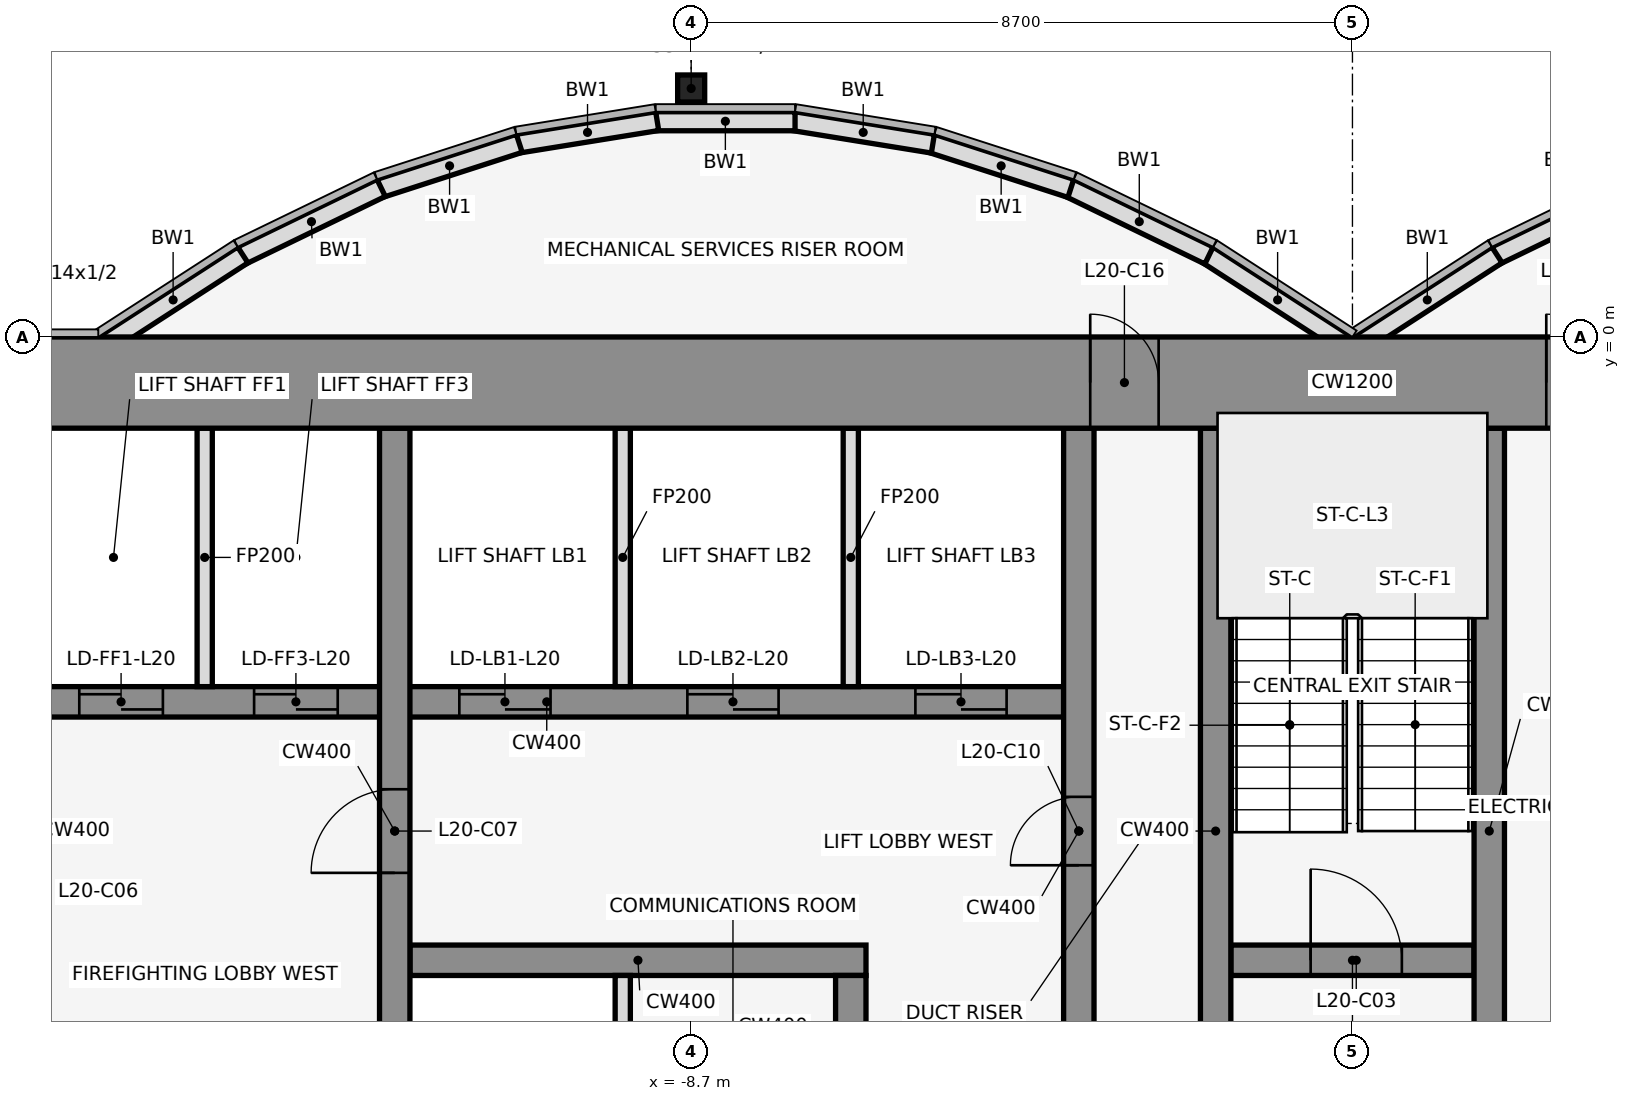
"""IFC4 building model, lengths in metres.
Left out: names, types, materials, properties, quantities, classifications, styles, units other than length and angle.
Written with IfcOpenShell. Run it as: python <this file> out.ifc"""

import sys

from ifc_helpers import new_model, si_unit, direction, frame, frame_2d, origin, origin_2d, place, context, subcontext, project, spatial, rectangle, hollow_rectangle, extrude, element, fill, save


model = new_model("IFC4")
c1 = context("Model", 3, precision=1e-05, world=origin(), true_north=direction((0.0, 1.0)))
c2 = subcontext(c1, "Body", "Model", "MODEL_VIEW")
j1 = project(units=[si_unit("LENGTHUNIT", "METRE"), si_unit("PLANEANGLEUNIT", "RADIAN")], contexts=[c1])
p1 = place(None, origin())
s1 = spatial("IfcSite", under=j1, at=p1, CompositionType="ELEMENT")
p2 = place(p1, origin())
s2 = spatial("IfcBuilding", under=s1, at=p2, CompositionType="ELEMENT")
p3 = place(p2, frame((0.0, 0.0, 98.1)))
s3 = spatial("IfcBuildingStorey", under=s2, at=p3, CompositionType="ELEMENT", Elevation=98.1)
p4 = place(p3, frame((-8.7, 3.269, 0.0), z_axis=(0.0, 0.0, 1.0), x_axis=(1.0, 0.0, 0.0)))
e1 = element("IfcColumn", 1, at=p4, inside=s3, PredefinedType="COLUMN", context=c2, shape_type="SweptSolid", body=[
    extrude(hollow_rectangle(XDim=0.356, YDim=0.356, WallThickness=0.012, at=origin_2d()), origin(), (0.0, 0.0, 1.0), 4.1),
])
p5 = place(p3, frame((3.721, 1.962, 0.0), z_axis=(0.0, 0.0, 1.0), x_axis=(-0.89982408427, -0.436252928206, 0.0)))
e2 = element("IfcWall", 2, at=p5, inside=s3, PredefinedType="STANDARD", context=c2, shape_type="SweptSolid", body=[
    extrude(rectangle(XDim=2.038, YDim=0.25, at=frame_2d((1.019, 0.0))), origin(), (0.0, 0.0, 1.0), 3.95),
])
for number, where, z_axis, x_axis in (
    (3, (1.901, 1.08, 0.0), (0.0, 0.0, 1.0), (-0.84, -0.543, 0.0)),
    (4, (-0.068, -0.105, 0.0), (0.0, 0.0, 1.0), (-0.84, 0.543, 0.0)),
):
    element("IfcWall", number, at=place(p3, frame(where, z_axis=z_axis, x_axis=x_axis)), inside=s3, PredefinedType="STANDARD", context=c2, shape_type="SweptSolid", body=[
        extrude(rectangle(XDim=2.183, YDim=0.25, at=frame_2d((1.091, 0.0))), origin(), (0.0, 0.0, 1.0), 3.95),
    ])
p6 = place(p3, frame((-1.888, 1.073, 0.0), z_axis=(0.0, 0.0, 1.0), x_axis=(-0.89982408427, 0.436252928206, 0.0)))
e5 = element("IfcWall", 5, at=p6, inside=s3, PredefinedType="STANDARD", context=c2, shape_type="SweptSolid", body=[
    extrude(rectangle(XDim=2.038, YDim=0.25, at=frame_2d((1.019, 0.0))), origin(), (0.0, 0.0, 1.0), 3.95),
])
p7 = place(p3, frame((-3.705, 1.955, 0.0), z_axis=(0.0, 0.0, 1.0), x_axis=(-0.951495806175, 0.307661714928, 0.0)))
e6 = element("IfcWall", 6, at=p7, inside=s3, PredefinedType="STANDARD", context=c2, shape_type="SweptSolid", body=[
    extrude(rectangle(XDim=1.927, YDim=0.25, at=frame_2d((0.963, 0.0))), origin(), (0.0, 0.0, 1.0), 3.95),
])
p8 = place(p3, frame((-5.52, 2.543, 0.0), z_axis=(0.0, 0.0, 1.0), x_axis=(-0.987181718931, 0.159600293885, 0.0)))
e7 = element("IfcWall", 7, at=p8, inside=s3, PredefinedType="STANDARD", context=c2, shape_type="SweptSolid", body=[
    extrude(rectangle(XDim=1.857, YDim=0.25, at=frame_2d((0.929, 0.0))), origin(), (0.0, 0.0, 1.0), 3.95),
])
p9 = place(p3, frame((-7.333, 2.838, 0.0), z_axis=(0.0, 0.0, 1.0), x_axis=(-1.0, 0.0, 0.0)))
e8 = element("IfcWall", 8, at=p9, inside=s3, PredefinedType="STANDARD", context=c2, shape_type="SweptSolid", body=[
    extrude(rectangle(XDim=1.833, YDim=0.25, at=frame_2d((0.917, 0.0))), origin(), (0.0, 0.0, 1.0), 3.95),
])
p10 = place(p3, frame((-9.147, 2.84, 0.0), z_axis=(0.0, 0.0, 1.0), x_axis=(-0.987181718931, -0.159600293885, 0.0)))
e9 = element("IfcWall", 9, at=p10, inside=s3, PredefinedType="STANDARD", context=c2, shape_type="SweptSolid", body=[
    extrude(rectangle(XDim=1.857, YDim=0.25, at=frame_2d((0.929, 0.0))), origin(), (0.0, 0.0, 1.0), 3.95),
])
p11 = place(p3, frame((-10.962, 2.548, 0.0), z_axis=(0.0, 0.0, 1.0), x_axis=(-0.951495806175, -0.307661714928, 0.0)))
e10 = element("IfcWall", 10, at=p11, inside=s3, PredefinedType="STANDARD", context=c2, shape_type="SweptSolid", body=[
    extrude(rectangle(XDim=1.927, YDim=0.25, at=frame_2d((0.963, 0.0))), origin(), (0.0, 0.0, 1.0), 3.95),
])
p12 = place(p3, frame((-12.779, 1.962, 0.0), z_axis=(0.0, 0.0, 1.0), x_axis=(-0.89982408427, -0.436252928206, 0.0)))
e11 = element("IfcWall", 11, at=p12, inside=s3, PredefinedType="STANDARD", context=c2, shape_type="SweptSolid", body=[
    extrude(rectangle(XDim=2.038, YDim=0.25, at=frame_2d((1.019, 0.0))), origin(), (0.0, 0.0, 1.0), 3.95),
])
p13 = place(p3, frame((-14.599, 1.08, 0.0), z_axis=(0.0, 0.0, 1.0), x_axis=(-0.83981312244, -0.542875602121, 0.0)))
e12 = element("IfcWall", 12, at=p13, inside=s3, PredefinedType="STANDARD", context=c2, shape_type="SweptSolid", body=[
    extrude(rectangle(XDim=2.183, YDim=0.25, at=frame_2d((1.091, 0.0))), origin(), (0.0, 0.0, 1.0), 3.95),
])
p14 = place(p3, frame((-12.4, -8.2, 0.0), z_axis=(0.0, 0.0, 1.0), x_axis=(1.0, 0.0, 0.0)))
e13 = element("IfcWall", 13, at=p14, inside=s3, PredefinedType="SHEAR", context=c2, shape_type="SweptSolid", body=[
    extrude(rectangle(XDim=6.0, YDim=0.4, at=frame_2d((3.0, 0.0))), origin(), (0.0, 0.0, 1.0), 4.1),
])
p15 = place(p3, frame((-1.6, -8.2, 0.0), z_axis=(0.0, 0.0, 1.0), x_axis=(1.0, 0.0, 0.0)))
e14 = element("IfcWall", 14, at=p15, inside=s3, PredefinedType="SHEAR", context=c2, shape_type="SweptSolid", body=[
    extrude(rectangle(XDim=3.2, YDim=0.4, at=frame_2d((1.6, 0.0))), origin(), (0.0, 0.0, 1.0), 4.1),
])
p16 = place(p15, frame((1.05, 0.0, 0.0)))
e15 = element("IfcOpeningElement", 15, at=p16, cuts=e14, PredefinedType="OPENING", context=c2, shape_type="SweptSolid", body=[
    extrude(rectangle(XDim=1.2, YDim=2.1, at=frame_2d((0.6, 1.05))), frame((0.0, 0.212, 0.0), z_axis=(0.0, -1.0, 0.0), x_axis=(1.0, 0.0, 0.0)), (0.0, 0.0, 1.0), 0.424),
])
p17 = place(p3, frame((-17.4, -4.8, 0.0), z_axis=(0.0, 0.0, 1.0), x_axis=(1.0, 0.0, 0.0)))
e16 = element("IfcWall", 16, at=p17, inside=s3, PredefinedType="SHEAR", context=c2, shape_type="SweptSolid", body=[
    extrude(rectangle(XDim=13.6, YDim=0.4, at=frame_2d((6.8, 0.0))), origin(), (0.0, 0.0, 1.0), 4.1),
])
p18 = place(p17, frame((0.65, 0.0, 0.0)))
e17 = element("IfcOpeningElement", 17, at=p18, cuts=e16, PredefinedType="OPENING", context=c2, shape_type="SweptSolid", body=[
    extrude(rectangle(XDim=1.1, YDim=2.1, at=frame_2d((0.55, 1.05))), frame((0.0, 0.212, 0.0), z_axis=(0.0, -1.0, 0.0), x_axis=(1.0, 0.0, 0.0)), (0.0, 0.0, 1.0), 0.424),
])
p19 = place(p17, frame((2.95, 0.0, 0.0)))
e18 = element("IfcOpeningElement", 18, at=p19, cuts=e16, PredefinedType="OPENING", context=c2, shape_type="SweptSolid", body=[
    extrude(rectangle(XDim=1.1, YDim=2.1, at=frame_2d((0.55, 1.05))), frame((0.0, 0.212, 0.0), z_axis=(0.0, -1.0, 0.0), x_axis=(1.0, 0.0, 0.0)), (0.0, 0.0, 1.0), 0.424),
])
p20 = place(p17, frame((5.65, 0.0, 0.0)))
e19 = element("IfcOpeningElement", 19, at=p20, cuts=e16, PredefinedType="OPENING", context=c2, shape_type="SweptSolid", body=[
    extrude(rectangle(XDim=1.2, YDim=2.1, at=frame_2d((0.6, 1.05))), frame((0.0, 0.212, 0.0), z_axis=(0.0, -1.0, 0.0), x_axis=(1.0, 0.0, 0.0)), (0.0, 0.0, 1.0), 0.424),
])
p21 = place(p17, frame((8.65, 0.0, 0.0)))
e20 = element("IfcOpeningElement", 20, at=p21, cuts=e16, PredefinedType="OPENING", context=c2, shape_type="SweptSolid", body=[
    extrude(rectangle(XDim=1.2, YDim=2.1, at=frame_2d((0.6, 1.05))), frame((0.0, 0.212, 0.0), z_axis=(0.0, -1.0, 0.0), x_axis=(1.0, 0.0, 0.0)), (0.0, 0.0, 1.0), 0.424),
])
p22 = place(p17, frame((11.65, 0.0, 0.0)))
e21 = element("IfcOpeningElement", 21, at=p22, cuts=e16, PredefinedType="OPENING", context=c2, shape_type="SweptSolid", body=[
    extrude(rectangle(XDim=1.2, YDim=2.1, at=frame_2d((0.6, 1.05))), frame((0.0, 0.212, 0.0), z_axis=(0.0, -1.0, 0.0), x_axis=(1.0, 0.0, 0.0)), (0.0, 0.0, 1.0), 0.424),
])
p23 = place(p3, frame((-15.1, -4.6, 0.0), z_axis=(0.0, 0.0, 1.0), x_axis=(0.0, 1.0, 0.0)))
e22 = element("IfcWall", 22, at=p23, inside=s3, PredefinedType="PARTITIONING", context=c2, shape_type="SweptSolid", body=[
    extrude(rectangle(XDim=3.4, YDim=0.2, at=frame_2d((1.7, 0.0))), origin(), (0.0, 0.0, 1.0), 3.018),
])
p24 = place(p3, frame((-12.6, -11.8, 0.0), z_axis=(0.0, 0.0, 1.0), x_axis=(0.0, 1.0, 0.0)))
e23 = element("IfcWall", 23, at=p24, inside=s3, PredefinedType="SHEAR", context=c2, shape_type="SweptSolid", body=[
    extrude(rectangle(XDim=10.6, YDim=0.4, at=frame_2d((5.3, 0.0))), origin(), (0.0, 0.0, 1.0), 4.1),
])
p25 = place(p24, frame((4.75, 0.0, 0.0)))
e24 = element("IfcOpeningElement", 24, at=p25, cuts=e23, PredefinedType="OPENING", context=c2, shape_type="SweptSolid", body=[
    extrude(rectangle(XDim=1.1, YDim=2.1, at=frame_2d((0.55, 1.05))), frame((0.0, 0.212, 0.0), z_axis=(0.0, -1.0, 0.0), x_axis=(1.0, 0.0, 0.0)), (0.0, 0.0, 1.0), 0.424),
])
for number, where, z_axis, x_axis in (
    (25, (-9.6, -11.8, 0.0), (0.0, 0.0, 1.0), (0.0, 1.0, 0.0)),
    (26, (-9.6, -4.6, 0.0), (0.0, 0.0, 1.0), (0.0, 1.0, 0.0)),
):
    element("IfcWall", number, at=place(p3, frame(where, z_axis=z_axis, x_axis=x_axis)), inside=s3, PredefinedType="PARTITIONING", context=c2, shape_type="SweptSolid", body=[
        extrude(rectangle(XDim=3.4, YDim=0.2, at=frame_2d((1.7, 0.0))), origin(), (0.0, 0.0, 1.0), 3.018),
    ])
p26 = place(p3, frame((-6.6, -11.8, 0.0), z_axis=(0.0, 0.0, 1.0), x_axis=(0.0, 1.0, 0.0)))
e27 = element("IfcWall", 27, at=p26, inside=s3, PredefinedType="SHEAR", context=c2, shape_type="SweptSolid", body=[
    extrude(rectangle(XDim=3.4, YDim=0.4, at=frame_2d((1.7, 0.0))), origin(), (0.0, 0.0, 1.0), 4.1),
])
p27 = place(p26, frame((1.25, 0.0, 0.0)))
e28 = element("IfcOpeningElement", 28, at=p27, cuts=e27, PredefinedType="OPENING", context=c2, shape_type="SweptSolid", body=[
    extrude(rectangle(XDim=0.9, YDim=2.1, at=frame_2d((0.45, 1.05))), frame((0.0, 0.212, 0.0), z_axis=(0.0, -1.0, 0.0), x_axis=(1.0, 0.0, 0.0)), (0.0, 0.0, 1.0), 0.424),
])
p28 = place(p3, frame((-6.6, -4.6, 0.0), z_axis=(0.0, 0.0, 1.0), x_axis=(0.0, 1.0, 0.0)))
e29 = element("IfcWall", 29, at=p28, inside=s3, PredefinedType="PARTITIONING", context=c2, shape_type="SweptSolid", body=[
    extrude(rectangle(XDim=3.4, YDim=0.2, at=frame_2d((1.7, 0.0))), origin(), (0.0, 0.0, 1.0), 3.018),
])
p29 = place(p3, frame((-3.6, -11.8, 0.0), z_axis=(0.0, 0.0, 1.0), x_axis=(0.0, 1.0, 0.0)))
e30 = element("IfcWall", 30, at=p29, inside=s3, PredefinedType="SHEAR", context=c2, shape_type="SweptSolid", body=[
    extrude(rectangle(XDim=10.6, YDim=0.4, at=frame_2d((5.3, 0.0))), origin(), (0.0, 0.0, 1.0), 4.1),
])
p30 = place(p29, frame((4.85, 0.0, 0.0)))
e31 = element("IfcOpeningElement", 31, at=p30, cuts=e30, PredefinedType="OPENING", context=c2, shape_type="SweptSolid", body=[
    extrude(rectangle(XDim=0.9, YDim=2.1, at=frame_2d((0.45, 1.05))), frame((0.0, 0.212, 0.0), z_axis=(0.0, -1.0, 0.0), x_axis=(1.0, 0.0, 0.0)), (0.0, 0.0, 1.0), 0.424),
])
for number, where, z_axis, x_axis in (
    (32, (-1.8, -11.8, 0.0), (0.0, 0.0, 1.0), (0.0, 1.0, 0.0)),
    (33, (1.8, -11.8, 0.0), (0.0, 0.0, 1.0), (0.0, 1.0, 0.0)),
):
    element("IfcWall", number, at=place(p3, frame(where, z_axis=z_axis, x_axis=x_axis)), inside=s3, PredefinedType="SHEAR", context=c2, shape_type="SweptSolid", body=[
        extrude(rectangle(XDim=10.6, YDim=0.4, at=frame_2d((5.3, 0.0))), origin(), (0.0, 0.0, 1.0), 4.1),
    ])
p31 = place(p3, frame((-22.0, -0.6, 0.0), z_axis=(0.0, 0.0, 1.0), x_axis=(1.0, 0.0, 0.0)))
e34 = element("IfcWall", 34, at=p31, inside=s3, PredefinedType="SHEAR", context=c2, shape_type="SweptSolid", body=[
    extrude(rectangle(XDim=44.0, YDim=1.2, at=frame_2d((22.0, 0.0))), origin(), (0.0, 0.0, 1.0), 4.1),
])
p32 = place(p31, frame((18.55, 0.0, 0.0)))
e35 = element("IfcOpeningElement", 35, at=p32, cuts=e34, PredefinedType="OPENING", context=c2, shape_type="SweptSolid", body=[
    extrude(rectangle(XDim=0.9, YDim=2.1, at=frame_2d((0.45, 1.05))), frame((0.0, 0.612, 0.0), z_axis=(0.0, -1.0, 0.0), x_axis=(1.0, 0.0, 0.0)), (0.0, 0.0, 1.0), 1.224),
])
p33 = place(p31, frame((24.55, 0.0, 0.0)))
e36 = element("IfcOpeningElement", 36, at=p33, cuts=e34, PredefinedType="OPENING", context=c2, shape_type="SweptSolid", body=[
    extrude(rectangle(XDim=0.9, YDim=2.1, at=frame_2d((0.45, 1.05))), frame((0.0, 0.612, 0.0), z_axis=(0.0, -1.0, 0.0), x_axis=(1.0, 0.0, 0.0)), (0.0, 0.0, 1.0), 1.224),
])
p34 = place(p16, origin())
e37 = element("IfcDoor", 37, at=p34, inside=s3, OperationType="SINGLE_SWING_LEFT", PredefinedType="DOOR", context=c2, shape_type="SweptSolid", body=[
    extrude(rectangle(XDim=1.2, YDim=2.1, at=frame_2d((0.6, 1.05))), frame((0.0, 0.025, 0.0), z_axis=(0.0, -1.0, 0.0), x_axis=(1.0, 0.0, 0.0)), (0.0, 0.0, 1.0), 0.05),
])
fill(e15, e37)
p35 = place(p18, origin())
e38 = element("IfcDoor", 38, at=p35, inside=s3, OperationType="DOUBLE_DOOR_SLIDING", PredefinedType="DOOR", context=c2, shape_type="SweptSolid", body=[
    extrude(rectangle(XDim=1.1, YDim=2.1, at=frame_2d((0.55, 1.05))), frame((0.0, 0.025, 0.0), z_axis=(0.0, -1.0, 0.0), x_axis=(1.0, 0.0, 0.0)), (0.0, 0.0, 1.0), 0.05),
])
fill(e17, e38)
p36 = place(p19, origin())
e39 = element("IfcDoor", 39, at=p36, inside=s3, OperationType="DOUBLE_DOOR_SLIDING", PredefinedType="DOOR", context=c2, shape_type="SweptSolid", body=[
    extrude(rectangle(XDim=1.1, YDim=2.1, at=frame_2d((0.55, 1.05))), frame((0.0, 0.025, 0.0), z_axis=(0.0, -1.0, 0.0), x_axis=(1.0, 0.0, 0.0)), (0.0, 0.0, 1.0), 0.05),
])
fill(e18, e39)
p37 = place(p20, origin())
e40 = element("IfcDoor", 40, at=p37, inside=s3, OperationType="DOUBLE_DOOR_SLIDING", PredefinedType="DOOR", context=c2, shape_type="SweptSolid", body=[
    extrude(rectangle(XDim=1.2, YDim=2.1, at=frame_2d((0.6, 1.05))), frame((0.0, 0.025, 0.0), z_axis=(0.0, -1.0, 0.0), x_axis=(1.0, 0.0, 0.0)), (0.0, 0.0, 1.0), 0.05),
])
fill(e19, e40)
p38 = place(p21, origin())
e41 = element("IfcDoor", 41, at=p38, inside=s3, OperationType="DOUBLE_DOOR_SLIDING", PredefinedType="DOOR", context=c2, shape_type="SweptSolid", body=[
    extrude(rectangle(XDim=1.2, YDim=2.1, at=frame_2d((0.6, 1.05))), frame((0.0, 0.025, 0.0), z_axis=(0.0, -1.0, 0.0), x_axis=(1.0, 0.0, 0.0)), (0.0, 0.0, 1.0), 0.05),
])
fill(e20, e41)
p39 = place(p22, origin())
e42 = element("IfcDoor", 42, at=p39, inside=s3, OperationType="DOUBLE_DOOR_SLIDING", PredefinedType="DOOR", context=c2, shape_type="SweptSolid", body=[
    extrude(rectangle(XDim=1.2, YDim=2.1, at=frame_2d((0.6, 1.05))), frame((0.0, 0.025, 0.0), z_axis=(0.0, -1.0, 0.0), x_axis=(1.0, 0.0, 0.0)), (0.0, 0.0, 1.0), 0.05),
])
fill(e21, e42)
p40 = place(p25, origin())
e43 = element("IfcDoor", 43, at=p40, inside=s3, OperationType="SINGLE_SWING_LEFT", PredefinedType="DOOR", context=c2, shape_type="SweptSolid", body=[
    extrude(rectangle(XDim=1.1, YDim=2.1, at=frame_2d((0.55, 1.05))), frame((0.0, 0.025, 0.0), z_axis=(0.0, -1.0, 0.0), x_axis=(1.0, 0.0, 0.0)), (0.0, 0.0, 1.0), 0.05),
])
fill(e24, e43)
p41 = place(p30, frame((0.9, 0.0, 0.0), z_axis=(0.0, 0.0, 1.0), x_axis=(-1.0, 0.0, 0.0)))
e44 = element("IfcDoor", 44, at=p41, inside=s3, OperationType="SINGLE_SWING_LEFT", PredefinedType="DOOR", context=c2, shape_type="SweptSolid", body=[
    extrude(rectangle(XDim=0.9, YDim=2.1, at=frame_2d((0.45, 1.05))), frame((0.0, 0.025, 0.0), z_axis=(0.0, -1.0, 0.0), x_axis=(1.0, 0.0, 0.0)), (0.0, 0.0, 1.0), 0.05),
])
fill(e31, e44)
p42 = place(p32, origin())
e45 = element("IfcDoor", 45, at=p42, inside=s3, OperationType="SINGLE_SWING_LEFT", PredefinedType="DOOR", context=c2, shape_type="SweptSolid", body=[
    extrude(rectangle(XDim=0.9, YDim=2.1, at=frame_2d((0.45, 1.05))), frame((0.0, 0.025, 0.0), z_axis=(0.0, -1.0, 0.0), x_axis=(1.0, 0.0, 0.0)), (0.0, 0.0, 1.0), 0.05),
])
fill(e35, e45)
p43 = place(p33, origin())
e46 = element("IfcDoor", 46, at=p43, inside=s3, OperationType="SINGLE_SWING_LEFT", PredefinedType="DOOR", context=c2, shape_type="SweptSolid", body=[
    extrude(rectangle(XDim=0.9, YDim=2.1, at=frame_2d((0.45, 1.05))), frame((0.0, 0.025, 0.0), z_axis=(0.0, -1.0, 0.0), x_axis=(1.0, 0.0, 0.0)), (0.0, 0.0, 1.0), 0.05),
])
fill(e36, e46)
save(model, sys.argv[1])
